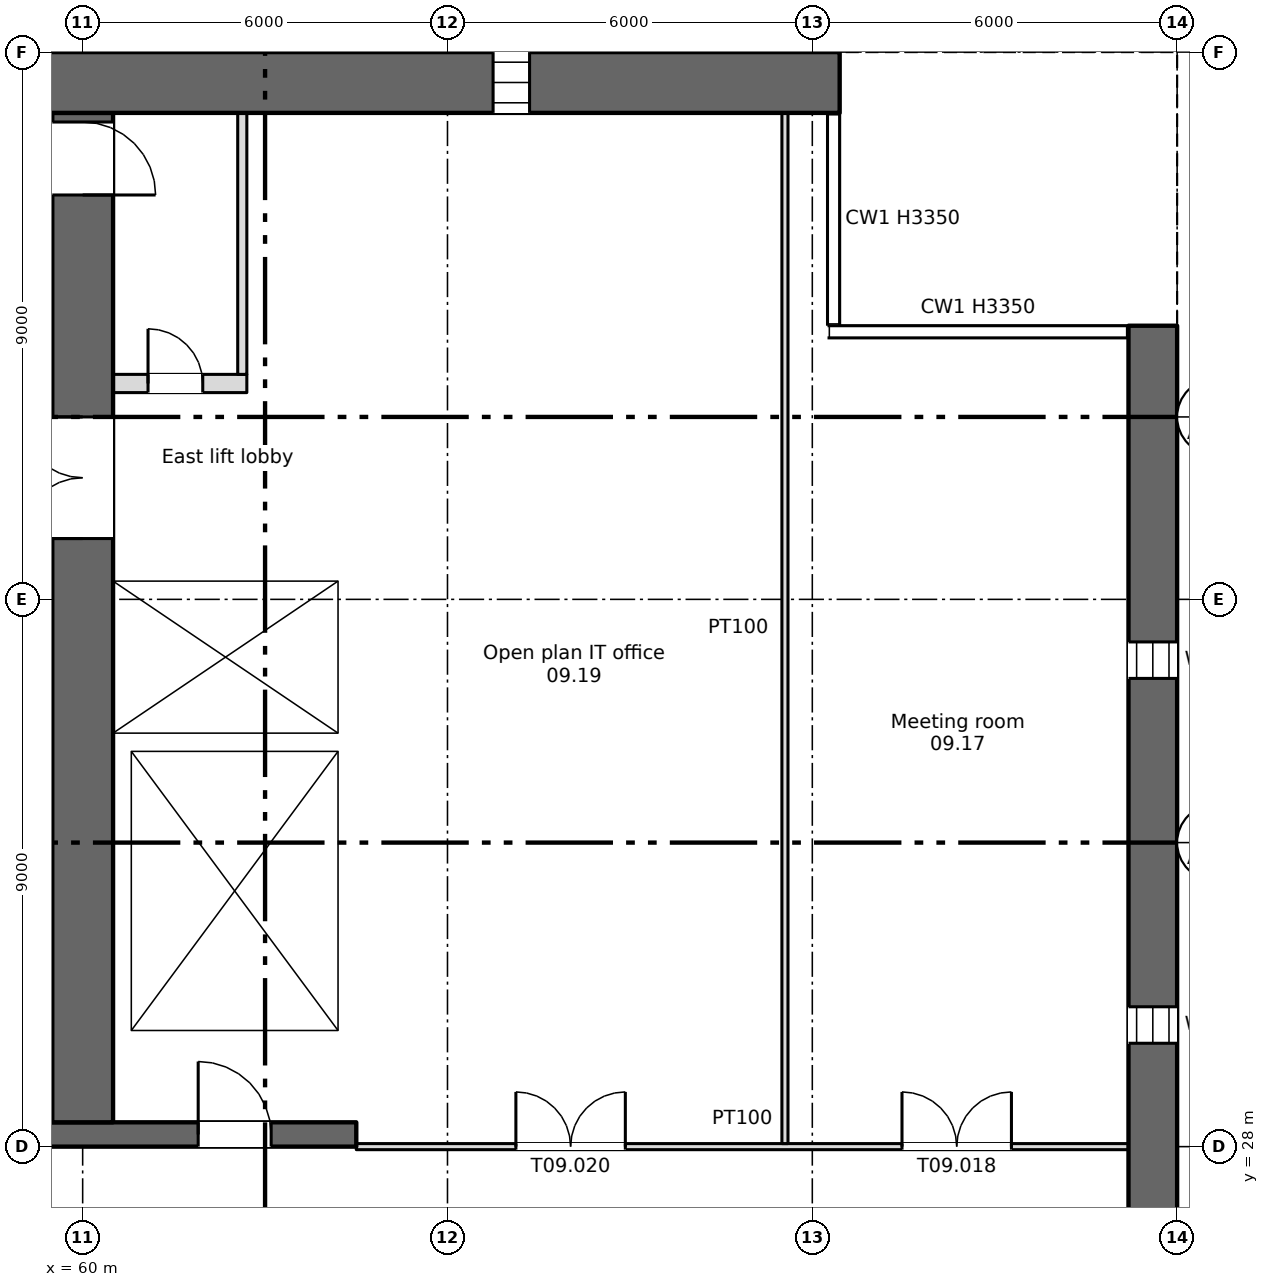
"""IFC4 building model, lengths in metres.
Left out: names, types, materials, properties, quantities, classifications, styles, units other than length and angle.
Written with IfcOpenShell. Run it as: python <this file> out.ifc"""

import sys

from ifc_helpers import new_model, si_unit, direction, frame, frame_2d, origin, place, context, subcontext, project, spatial, rectangle, extrude, element, fill, save


model = new_model("IFC4")
c1 = context("Model", 3, precision=1e-05, world=origin(), true_north=direction((0.0, 1.0)))
c2 = subcontext(c1, "Body", "Model", "MODEL_VIEW")
j1 = project(units=[si_unit("LENGTHUNIT", "METRE"), si_unit("PLANEANGLEUNIT", "RADIAN")], contexts=[c1])
p1 = place(None, origin())
s1 = spatial("IfcSite", under=j1, at=p1, CompositionType="ELEMENT")
p2 = place(p1, origin())
s2 = spatial("IfcBuilding", under=s1, at=p2, CompositionType="ELEMENT")
p3 = place(p2, frame((0.0, 0.0, 37.5)))
s3 = spatial("IfcBuildingStorey", under=s2, at=p3, CompositionType="ELEMENT", Elevation=37.5)
p4 = place(p3, frame((77.6, 4.5, 0.0), z_axis=(0.0, 0.0, 1.0), x_axis=(0.0, 1.0, 0.0)))
e1 = element("IfcWall", 1, at=p4, inside=s3, PredefinedType="SHEAR", context=c2, shape_type="SweptSolid", body=[
    extrude(rectangle(XDim=37.0, YDim=0.8, at=frame_2d((18.5, 0.0))), origin(), (0.0, 0.0, 1.0), 3.35),
])
p5 = place(p4, frame((1.2, 0.0, 0.6)))
e2 = element("IfcOpeningElement", 2, at=p5, cuts=e1, PredefinedType="OPENING", context=c2, shape_type="SweptSolid", body=[
    extrude(rectangle(XDim=0.6, YDim=2.4, at=frame_2d((0.3, 1.2))), frame((0.0, 0.41, 0.0), z_axis=(0.0, -1.0, 0.0), x_axis=(1.0, 0.0, 0.0)), (0.0, 0.0, 1.0), 0.82),
])
p6 = place(p4, frame((7.2, 0.0, 0.6)))
e3 = element("IfcOpeningElement", 3, at=p6, cuts=e1, PredefinedType="OPENING", context=c2, shape_type="SweptSolid", body=[
    extrude(rectangle(XDim=0.6, YDim=2.4, at=frame_2d((0.3, 1.2))), frame((0.0, 0.41, 0.0), z_axis=(0.0, -1.0, 0.0), x_axis=(1.0, 0.0, 0.0)), (0.0, 0.0, 1.0), 0.82),
])
p7 = place(p4, frame((13.2, 0.0, 0.6)))
e4 = element("IfcOpeningElement", 4, at=p7, cuts=e1, PredefinedType="OPENING", context=c2, shape_type="SweptSolid", body=[
    extrude(rectangle(XDim=0.6, YDim=2.4, at=frame_2d((0.3, 1.2))), frame((0.0, 0.41, 0.0), z_axis=(0.0, -1.0, 0.0), x_axis=(1.0, 0.0, 0.0)), (0.0, 0.0, 1.0), 0.82),
])
p8 = place(p4, frame((19.2, 0.0, 0.6)))
e5 = element("IfcOpeningElement", 5, at=p8, cuts=e1, PredefinedType="OPENING", context=c2, shape_type="SweptSolid", body=[
    extrude(rectangle(XDim=0.6, YDim=2.4, at=frame_2d((0.3, 1.2))), frame((0.0, 0.41, 0.0), z_axis=(0.0, -1.0, 0.0), x_axis=(1.0, 0.0, 0.0)), (0.0, 0.0, 1.0), 0.82),
])
p9 = place(p4, frame((25.2, 0.0, 0.6)))
e6 = element("IfcOpeningElement", 6, at=p9, cuts=e1, PredefinedType="OPENING", context=c2, shape_type="SweptSolid", body=[
    extrude(rectangle(XDim=0.6, YDim=2.4, at=frame_2d((0.3, 1.2))), frame((0.0, 0.41, 0.0), z_axis=(0.0, -1.0, 0.0), x_axis=(1.0, 0.0, 0.0)), (0.0, 0.0, 1.0), 0.82),
])
p10 = place(p4, frame((31.2, 0.0, 0.6)))
e7 = element("IfcOpeningElement", 7, at=p10, cuts=e1, PredefinedType="OPENING", context=c2, shape_type="SweptSolid", body=[
    extrude(rectangle(XDim=0.6, YDim=2.4, at=frame_2d((0.3, 1.2))), frame((0.0, 0.41, 0.0), z_axis=(0.0, -1.0, 0.0), x_axis=(1.0, 0.0, 0.0)), (0.0, 0.0, 1.0), 0.82),
])
p11 = place(p3, frame((5.55, 45.5, 0.0), z_axis=(0.0, 0.0, 1.0), x_axis=(1.0, 0.0, 0.0)))
e8 = element("IfcWall", 8, at=p11, inside=s3, PredefinedType="SHEAR", context=c2, shape_type="SweptSolid", body=[
    extrude(rectangle(XDim=66.9, YDim=1.0, at=frame_2d((33.45, 0.0))), origin(), (0.0, 0.0, 1.0), 3.35),
])
p12 = place(p11, frame((7.2, 0.0, 0.6)))
e9 = element("IfcOpeningElement", 9, at=p12, cuts=e8, PredefinedType="OPENING", context=c2, shape_type="SweptSolid", body=[
    extrude(rectangle(XDim=0.6, YDim=2.4, at=frame_2d((0.3, 1.2))), frame((0.0, 0.51, 0.0), z_axis=(0.0, -1.0, 0.0), x_axis=(1.0, 0.0, 0.0)), (0.0, 0.0, 1.0), 1.02),
])
p13 = place(p11, frame((61.2, 0.0, 0.6)))
e10 = element("IfcOpeningElement", 10, at=p13, cuts=e8, PredefinedType="OPENING", context=c2, shape_type="SweptSolid", body=[
    extrude(rectangle(XDim=0.6, YDim=2.4, at=frame_2d((0.3, 1.2))), frame((0.0, 0.51, 0.0), z_axis=(0.0, -1.0, 0.0), x_axis=(1.0, 0.0, 0.0)), (0.0, 0.0, 1.0), 1.02),
])
p14 = place(p3, frame((6.7, 28.2, 0.0), z_axis=(0.0, 0.0, 1.0), x_axis=(1.0, 0.0, 0.0)))
e11 = element("IfcWall", 11, at=p14, inside=s3, PredefinedType="SHEAR", context=c2, shape_type="SweptSolid", body=[
    extrude(rectangle(XDim=57.8, YDim=0.4, at=frame_2d((28.9, 0.0))), origin(), (0.0, 0.0, 1.0), 3.35),
])
p15 = place(p14, frame((12.062, 0.0, 0.0)))
e12 = element("IfcOpeningElement", 12, at=p15, cuts=e11, PredefinedType="OPENING", context=c2, shape_type="SweptSolid", body=[
    extrude(rectangle(XDim=0.9, YDim=2.1, at=frame_2d((0.45, 1.05))), frame((0.0, 0.21, 0.0), z_axis=(0.0, -1.0, 0.0), x_axis=(1.0, 0.0, 0.0)), (0.0, 0.0, 1.0), 0.42),
])
p16 = place(p14, frame((14.637, 0.0, 0.0)))
e13 = element("IfcOpeningElement", 13, at=p16, cuts=e11, PredefinedType="OPENING", context=c2, shape_type="SweptSolid", body=[
    extrude(rectangle(XDim=0.9, YDim=2.1, at=frame_2d((0.45, 1.05))), frame((0.0, 0.21, 0.0), z_axis=(0.0, -1.0, 0.0), x_axis=(1.0, 0.0, 0.0)), (0.0, 0.0, 1.0), 0.42),
])
p17 = place(p14, frame((49.062, 0.0, 0.0)))
e14 = element("IfcOpeningElement", 14, at=p17, cuts=e11, PredefinedType="OPENING", context=c2, shape_type="SweptSolid", body=[
    extrude(rectangle(XDim=0.9, YDim=2.1, at=frame_2d((0.45, 1.05))), frame((0.0, 0.21, 0.0), z_axis=(0.0, -1.0, 0.0), x_axis=(1.0, 0.0, 0.0)), (0.0, 0.0, 1.0), 0.42),
])
p18 = place(p14, frame((51.637, 0.0, 0.0)))
e15 = element("IfcOpeningElement", 15, at=p18, cuts=e11, PredefinedType="OPENING", context=c2, shape_type="SweptSolid", body=[
    extrude(rectangle(XDim=0.9, YDim=2.1, at=frame_2d((0.45, 1.05))), frame((0.0, 0.21, 0.0), z_axis=(0.0, -1.0, 0.0), x_axis=(1.0, 0.0, 0.0)), (0.0, 0.0, 1.0), 0.42),
])
p19 = place(p14, frame((1.35, 0.0, 0.0)))
e16 = element("IfcOpeningElement", 16, at=p19, cuts=e11, PredefinedType="OPENING", context=c2, shape_type="SweptSolid", body=[
    extrude(rectangle(XDim=0.9, YDim=2.1, at=frame_2d((0.45, 1.05))), frame((0.0, 0.21, 0.0), z_axis=(0.0, -1.0, 0.0), x_axis=(1.0, 0.0, 0.0)), (0.0, 0.0, 1.0), 0.42),
])
p20 = place(p14, frame((4.7, 0.0, 0.0)))
e17 = element("IfcOpeningElement", 17, at=p20, cuts=e11, PredefinedType="OPENING", context=c2, shape_type="SweptSolid", body=[
    extrude(rectangle(XDim=1.2, YDim=2.1, at=frame_2d((0.6, 1.05))), frame((0.0, 0.21, 0.0), z_axis=(0.0, -1.0, 0.0), x_axis=(1.0, 0.0, 0.0)), (0.0, 0.0, 1.0), 0.42),
])
p21 = place(p14, frame((31.7, 0.0, 0.0)))
e18 = element("IfcOpeningElement", 18, at=p21, cuts=e11, PredefinedType="OPENING", context=c2, shape_type="SweptSolid", body=[
    extrude(rectangle(XDim=1.2, YDim=2.1, at=frame_2d((0.6, 1.05))), frame((0.0, 0.21, 0.0), z_axis=(0.0, -1.0, 0.0), x_axis=(1.0, 0.0, 0.0)), (0.0, 0.0, 1.0), 0.42),
])
p22 = place(p14, frame((55.2, 0.0, 0.0)))
e19 = element("IfcOpeningElement", 19, at=p22, cuts=e11, PredefinedType="OPENING", context=c2, shape_type="SweptSolid", body=[
    extrude(rectangle(XDim=1.2, YDim=2.1, at=frame_2d((0.6, 1.05))), frame((0.0, 0.21, 0.0), z_axis=(0.0, -1.0, 0.0), x_axis=(1.0, 0.0, 0.0)), (0.0, 0.0, 1.0), 0.42),
])
p23 = place(p14, frame((21.7, 0.0, 0.0)))
e20 = element("IfcOpeningElement", 20, at=p23, cuts=e11, PredefinedType="OPENING", context=c2, shape_type="SweptSolid", body=[
    extrude(rectangle(XDim=1.2, YDim=2.1, at=frame_2d((0.6, 1.05))), frame((0.0, 0.21, 0.0), z_axis=(0.0, -1.0, 0.0), x_axis=(1.0, 0.0, 0.0)), (0.0, 0.0, 1.0), 0.42),
])
p24 = place(p14, frame((41.7, 0.0, 0.0)))
e21 = element("IfcOpeningElement", 21, at=p24, cuts=e11, PredefinedType="OPENING", context=c2, shape_type="SweptSolid", body=[
    extrude(rectangle(XDim=1.2, YDim=2.1, at=frame_2d((0.6, 1.05))), frame((0.0, 0.21, 0.0), z_axis=(0.0, -1.0, 0.0), x_axis=(1.0, 0.0, 0.0)), (0.0, 0.0, 1.0), 0.42),
])
p25 = place(p14, frame((24.85, 0.0, 0.0)))
e22 = element("IfcOpeningElement", 22, at=p25, cuts=e11, PredefinedType="OPENING", context=c2, shape_type="SweptSolid", body=[
    extrude(rectangle(XDim=2.4, YDim=2.1, at=frame_2d((1.2, 1.05))), frame((0.0, 0.21, 0.0), z_axis=(0.0, -1.0, 0.0), x_axis=(1.0, 0.0, 0.0)), (0.0, 0.0, 1.0), 0.42),
])
p26 = place(p14, frame((37.35, 0.0, 0.0)))
e23 = element("IfcOpeningElement", 23, at=p26, cuts=e11, PredefinedType="OPENING", context=c2, shape_type="SweptSolid", body=[
    extrude(rectangle(XDim=2.4, YDim=2.1, at=frame_2d((1.2, 1.05))), frame((0.0, 0.21, 0.0), z_axis=(0.0, -1.0, 0.0), x_axis=(1.0, 0.0, 0.0)), (0.0, 0.0, 1.0), 0.42),
])
p27 = place(p14, frame((7.85, 0.0, 0.0)))
e24 = element("IfcOpeningElement", 24, at=p27, cuts=e11, PredefinedType="OPENING", context=c2, shape_type="SweptSolid", body=[
    extrude(rectangle(XDim=2.4, YDim=2.1, at=frame_2d((1.2, 1.05))), frame((0.0, 0.21, 0.0), z_axis=(0.0, -1.0, 0.0), x_axis=(1.0, 0.0, 0.0)), (0.0, 0.0, 1.0), 0.42),
])
p28 = place(p14, frame((28.85, 0.0, 0.0)))
e25 = element("IfcOpeningElement", 25, at=p28, cuts=e11, PredefinedType="OPENING", context=c2, shape_type="SweptSolid", body=[
    extrude(rectangle(XDim=0.9, YDim=2.1, at=frame_2d((0.45, 1.05))), frame((0.0, 0.21, 0.0), z_axis=(0.0, -1.0, 0.0), x_axis=(1.0, 0.0, 0.0)), (0.0, 0.0, 1.0), 0.42),
])
p29 = place(p14, frame((34.85, 0.0, 0.0)))
e26 = element("IfcOpeningElement", 26, at=p29, cuts=e11, PredefinedType="OPENING", context=c2, shape_type="SweptSolid", body=[
    extrude(rectangle(XDim=0.9, YDim=2.1, at=frame_2d((0.45, 1.05))), frame((0.0, 0.21, 0.0), z_axis=(0.0, -1.0, 0.0), x_axis=(1.0, 0.0, 0.0)), (0.0, 0.0, 1.0), 0.42),
])
p30 = place(p3, frame((64.35, 34.8, 0.0), z_axis=(0.0, 0.0, 1.0), x_axis=(0.0, 1.0, 0.0)))
e27 = element("IfcWall", 27, at=p30, inside=s3, PredefinedType="SHEAR", context=c2, shape_type="SweptSolid", body=[
    extrude(rectangle(XDim=10.2, YDim=0.3, at=frame_2d((5.1, 0.0))), origin(), (0.0, 0.0, 1.0), 3.35),
])
p31 = place(p3, frame((60.0, 28.4, 0.0), z_axis=(0.0, 0.0, 1.0), x_axis=(0.0, 1.0, 0.0)))
e28 = element("IfcWall", 28, at=p31, inside=s3, PredefinedType="SHEAR", context=c2, shape_type="SweptSolid", body=[
    extrude(rectangle(XDim=16.6, YDim=1.0, at=frame_2d((8.3, 0.0))), origin(), (0.0, 0.0, 1.0), 3.35),
])
p32 = place(p31, frame((9.6, 0.0, 0.0)))
e29 = element("IfcOpeningElement", 29, at=p32, cuts=e28, PredefinedType="OPENING", context=c2, shape_type="SweptSolid", body=[
    extrude(rectangle(XDim=2.0, YDim=2.1, at=frame_2d((1.0, 1.05))), frame((0.0, 0.51, 0.0), z_axis=(0.0, -1.0, 0.0), x_axis=(1.0, 0.0, 0.0)), (0.0, 0.0, 1.0), 1.02),
])
p33 = place(p31, frame((15.25, 0.0, 0.0)))
e30 = element("IfcOpeningElement", 30, at=p33, cuts=e28, PredefinedType="OPENING", context=c2, shape_type="SweptSolid", body=[
    extrude(rectangle(XDim=1.2, YDim=2.1, at=frame_2d((0.6, 1.05))), frame((0.0, 0.51, 0.0), z_axis=(0.0, -1.0, 0.0), x_axis=(1.0, 0.0, 0.0)), (0.0, 0.0, 1.0), 1.02),
])
for number, where, z_axis, x_axis in (
    (31, (60.65, 28.4, 0.0), (0.0, 0.0, 1.0), (0.0, 1.0, 0.0)),
    (32, (64.35, 28.4, 0.0), (0.0, 0.0, 1.0), (0.0, 1.0, 0.0)),
):
    element("IfcWall", number, at=place(p3, frame(where, z_axis=z_axis, x_axis=x_axis)), inside=s3, PredefinedType="SHEAR", context=c2, shape_type="SweptSolid", body=[
        extrude(rectangle(XDim=6.1, YDim=0.3, at=frame_2d((3.05, 0.0))), origin(), (0.0, 0.0, 1.0), 3.35),
    ])
p34 = place(p3, frame((47.3, 34.65, 0.0), z_axis=(0.0, 0.0, 1.0), x_axis=(1.0, 0.0, 0.0)))
e33 = element("IfcWall", 33, at=p34, inside=s3, PredefinedType="SHEAR", context=c2, shape_type="SweptSolid", body=[
    extrude(rectangle(XDim=12.2, YDim=0.3, at=frame_2d((6.1, 0.0))), origin(), (0.0, 0.0, 1.0), 3.35),
])
p35 = place(p34, frame((1.3, 0.0, 0.0)))
e34 = element("IfcOpeningElement", 34, at=p35, cuts=e33, PredefinedType="OPENING", context=c2, shape_type="SweptSolid", body=[
    extrude(rectangle(XDim=1.1, YDim=2.1, at=frame_2d((0.55, 1.05))), frame((0.0, 0.16, 0.0), z_axis=(0.0, -1.0, 0.0), x_axis=(1.0, 0.0, 0.0)), (0.0, 0.0, 1.0), 0.32),
])
p36 = place(p3, frame((60.5, 34.65, 0.0), z_axis=(0.0, 0.0, 1.0), x_axis=(1.0, 0.0, 0.0)))
e35 = element("IfcWall", 35, at=p36, inside=s3, PredefinedType="SHEAR", context=c2, shape_type="SweptSolid", body=[
    extrude(rectangle(XDim=4.0, YDim=0.3, at=frame_2d((2.0, 0.0))), origin(), (0.0, 0.0, 1.0), 3.35),
])
p37 = place(p3, frame((60.5, 37.45, 0.0), z_axis=(0.0, 0.0, 1.0), x_axis=(1.0, 0.0, 0.0)))
e36 = element("IfcWall", 36, at=p37, inside=s3, PredefinedType="SHEAR", context=c2, shape_type="SweptSolid", body=[
    extrude(rectangle(XDim=3.7, YDim=0.3, at=frame_2d((1.85, 0.0))), origin(), (0.0, 0.0, 1.0), 3.35),
])
p38 = place(p37, frame((1.3, 0.0, 0.0)))
e37 = element("IfcOpeningElement", 37, at=p38, cuts=e36, PredefinedType="OPENING", context=c2, shape_type="SweptSolid", body=[
    extrude(rectangle(XDim=1.1, YDim=2.1, at=frame_2d((0.55, 1.05))), frame((0.0, 0.16, 0.0), z_axis=(0.0, -1.0, 0.0), x_axis=(1.0, 0.0, 0.0)), (0.0, 0.0, 1.0), 0.32),
])
p39 = place(p3, frame((60.5, 40.55, 0.0), z_axis=(0.0, 0.0, 1.0), x_axis=(1.0, 0.0, 0.0)))
e38 = element("IfcWall", 38, at=p39, inside=s3, PredefinedType="PARTITIONING", context=c2, shape_type="SweptSolid", body=[
    extrude(rectangle(XDim=2.2, YDim=0.3, at=frame_2d((1.1, 0.0))), origin(), (0.0, 0.0, 1.0), 3.35),
])
p40 = place(p39, frame((0.575, 0.0, 0.0)))
e39 = element("IfcOpeningElement", 39, at=p40, cuts=e38, PredefinedType="OPENING", context=c2, shape_type="SweptSolid", body=[
    extrude(rectangle(XDim=0.9, YDim=2.1, at=frame_2d((0.45, 1.05))), frame((0.0, 0.16, 0.0), z_axis=(0.0, -1.0, 0.0), x_axis=(1.0, 0.0, 0.0)), (0.0, 0.0, 1.0), 0.32),
])
p41 = place(p3, frame((62.625, 40.7, 0.0), z_axis=(0.0, 0.0, 1.0), x_axis=(0.0, 1.0, 0.0)))
e40 = element("IfcWall", 40, at=p41, inside=s3, PredefinedType="PARTITIONING", context=c2, shape_type="SweptSolid", body=[
    extrude(rectangle(XDim=4.3, YDim=0.15, at=frame_2d((2.15, 0.0))), origin(), (0.0, 0.0, 1.0), 3.35),
])
p42 = place(p3, frame((64.5, 28.0, 0.0), z_axis=(0.0, 0.0, 1.0), x_axis=(1.0, 0.0, 0.0)))
e41 = element("IfcWall", 41, at=p42, inside=s3, PredefinedType="PARTITIONING", context=c2, shape_type="SweptSolid", body=[
    extrude(rectangle(XDim=12.7, YDim=0.1, at=frame_2d((6.35, 0.0))), origin(), (0.0, 0.0, 1.0), 3.35),
])
p43 = place(p42, frame((8.975, 0.0, 0.0)))
e42 = element("IfcOpeningElement", 42, at=p43, cuts=e41, PredefinedType="OPENING", context=c2, shape_type="SweptSolid", body=[
    extrude(rectangle(XDim=1.8, YDim=2.1, at=frame_2d((0.9, 1.05))), frame((0.0, 0.06, 0.0), z_axis=(0.0, -1.0, 0.0), x_axis=(1.0, 0.0, 0.0)), (0.0, 0.0, 1.0), 0.12),
])
p44 = place(p42, frame((2.625, 0.0, 0.0)))
e43 = element("IfcOpeningElement", 43, at=p44, cuts=e41, PredefinedType="OPENING", context=c2, shape_type="SweptSolid", body=[
    extrude(rectangle(XDim=1.8, YDim=2.1, at=frame_2d((0.9, 1.05))), frame((0.0, 0.06, 0.0), z_axis=(0.0, -1.0, 0.0), x_axis=(1.0, 0.0, 0.0)), (0.0, 0.0, 1.0), 0.12),
])
p45 = place(p3, frame((71.55, 28.05, 0.0), z_axis=(0.0, 0.0, 1.0), x_axis=(0.0, 1.0, 0.0)))
e44 = element("IfcWall", 44, at=p45, inside=s3, PredefinedType="PARTITIONING", context=c2, shape_type="SweptSolid", body=[
    extrude(rectangle(XDim=16.95, YDim=0.1, at=frame_2d((8.475, 0.0))), origin(), (0.0, 0.0, 1.0), 3.35),
])
p46 = place(p13, origin())
e45 = element("IfcWindow", 45, at=p46, inside=s3, PartitioningType="SINGLE_PANEL", PredefinedType="WINDOW", context=c2, shape_type="SweptSolid", body=[
    extrude(rectangle(XDim=0.6, YDim=2.4, at=frame_2d((0.3, 1.2))), frame((0.0, 0.03, 0.0), z_axis=(0.0, -1.0, 0.0), x_axis=(1.0, 0.0, 0.0)), (0.0, 0.0, 1.0), 0.06),
])
fill(e10, e45)
p47 = place(p9, origin())
e46 = element("IfcWindow", 46, at=p47, inside=s3, PartitioningType="SINGLE_PANEL", PredefinedType="WINDOW", context=c2, shape_type="SweptSolid", body=[
    extrude(rectangle(XDim=0.6, YDim=2.4, at=frame_2d((0.3, 1.2))), frame((0.0, 0.03, 0.0), z_axis=(0.0, -1.0, 0.0), x_axis=(1.0, 0.0, 0.0)), (0.0, 0.0, 1.0), 0.06),
])
fill(e6, e46)
p48 = place(p10, origin())
e47 = element("IfcWindow", 47, at=p48, inside=s3, PartitioningType="SINGLE_PANEL", PredefinedType="WINDOW", context=c2, shape_type="SweptSolid", body=[
    extrude(rectangle(XDim=0.6, YDim=2.4, at=frame_2d((0.3, 1.2))), frame((0.0, 0.03, 0.0), z_axis=(0.0, -1.0, 0.0), x_axis=(1.0, 0.0, 0.0)), (0.0, 0.0, 1.0), 0.06),
])
fill(e7, e47)
p49 = place(p40, origin())
e48 = element("IfcDoor", 48, at=p49, inside=s3, OperationType="SINGLE_SWING_LEFT", PredefinedType="DOOR", context=c2, shape_type="SweptSolid", body=[
    extrude(rectangle(XDim=0.9, YDim=2.1, at=frame_2d((0.45, 1.05))), frame((0.0, 0.025, 0.0), z_axis=(0.0, -1.0, 0.0), x_axis=(1.0, 0.0, 0.0)), (0.0, 0.0, 1.0), 0.05),
])
fill(e39, e48)
p50 = place(p38, origin())
e49 = element("IfcDoor", 49, at=p50, inside=s3, OperationType="SLIDING_TO_LEFT", PredefinedType="DOOR", context=c2, shape_type="SweptSolid", body=[
    extrude(rectangle(XDim=1.1, YDim=2.1, at=frame_2d((0.55, 1.05))), frame((0.0, 0.025, 0.0), z_axis=(0.0, -1.0, 0.0), x_axis=(1.0, 0.0, 0.0)), (0.0, 0.0, 1.0), 0.05),
])
fill(e37, e49)
p51 = place(p22, origin())
e50 = element("IfcDoor", 50, at=p51, inside=s3, OperationType="SINGLE_SWING_LEFT", PredefinedType="DOOR", context=c2, shape_type="SweptSolid", body=[
    extrude(rectangle(XDim=1.2, YDim=2.1, at=frame_2d((0.6, 1.05))), frame((0.0, 0.025, 0.0), z_axis=(0.0, -1.0, 0.0), x_axis=(1.0, 0.0, 0.0)), (0.0, 0.0, 1.0), 0.05),
])
fill(e19, e50)
p52 = place(p32, origin())
e51 = element("IfcDoor", 51, at=p52, inside=s3, OperationType="DOUBLE_DOOR_SINGLE_SWING", PredefinedType="DOOR", context=c2, shape_type="SweptSolid", body=[
    extrude(rectangle(XDim=2.0, YDim=2.1, at=frame_2d((1.0, 1.05))), frame((0.0, 0.025, 0.0), z_axis=(0.0, -1.0, 0.0), x_axis=(1.0, 0.0, 0.0)), (0.0, 0.0, 1.0), 0.05),
])
fill(e29, e51)
p53 = place(p33, origin())
e52 = element("IfcDoor", 52, at=p53, inside=s3, OperationType="SINGLE_SWING_LEFT", PredefinedType="DOOR", context=c2, shape_type="SweptSolid", body=[
    extrude(rectangle(XDim=1.2, YDim=2.1, at=frame_2d((0.6, 1.05))), frame((0.0, 0.025, 0.0), z_axis=(0.0, -1.0, 0.0), x_axis=(1.0, 0.0, 0.0)), (0.0, 0.0, 1.0), 0.05),
])
fill(e30, e52)
p54 = place(p43, origin())
e53 = element("IfcDoor", 53, at=p54, inside=s3, OperationType="DOUBLE_DOOR_SINGLE_SWING", PredefinedType="DOOR", context=c2, shape_type="SweptSolid", body=[
    extrude(rectangle(XDim=1.8, YDim=2.1, at=frame_2d((0.9, 1.05))), frame((0.0, 0.025, 0.0), z_axis=(0.0, -1.0, 0.0), x_axis=(1.0, 0.0, 0.0)), (0.0, 0.0, 1.0), 0.05),
])
fill(e42, e53)
p55 = place(p44, origin())
e54 = element("IfcDoor", 54, at=p55, inside=s3, OperationType="DOUBLE_DOOR_SINGLE_SWING", PredefinedType="DOOR", context=c2, shape_type="SweptSolid", body=[
    extrude(rectangle(XDim=1.8, YDim=2.1, at=frame_2d((0.9, 1.05))), frame((0.0, 0.025, 0.0), z_axis=(0.0, -1.0, 0.0), x_axis=(1.0, 0.0, 0.0)), (0.0, 0.0, 1.0), 0.05),
])
fill(e43, e54)
save(model, sys.argv[1])
